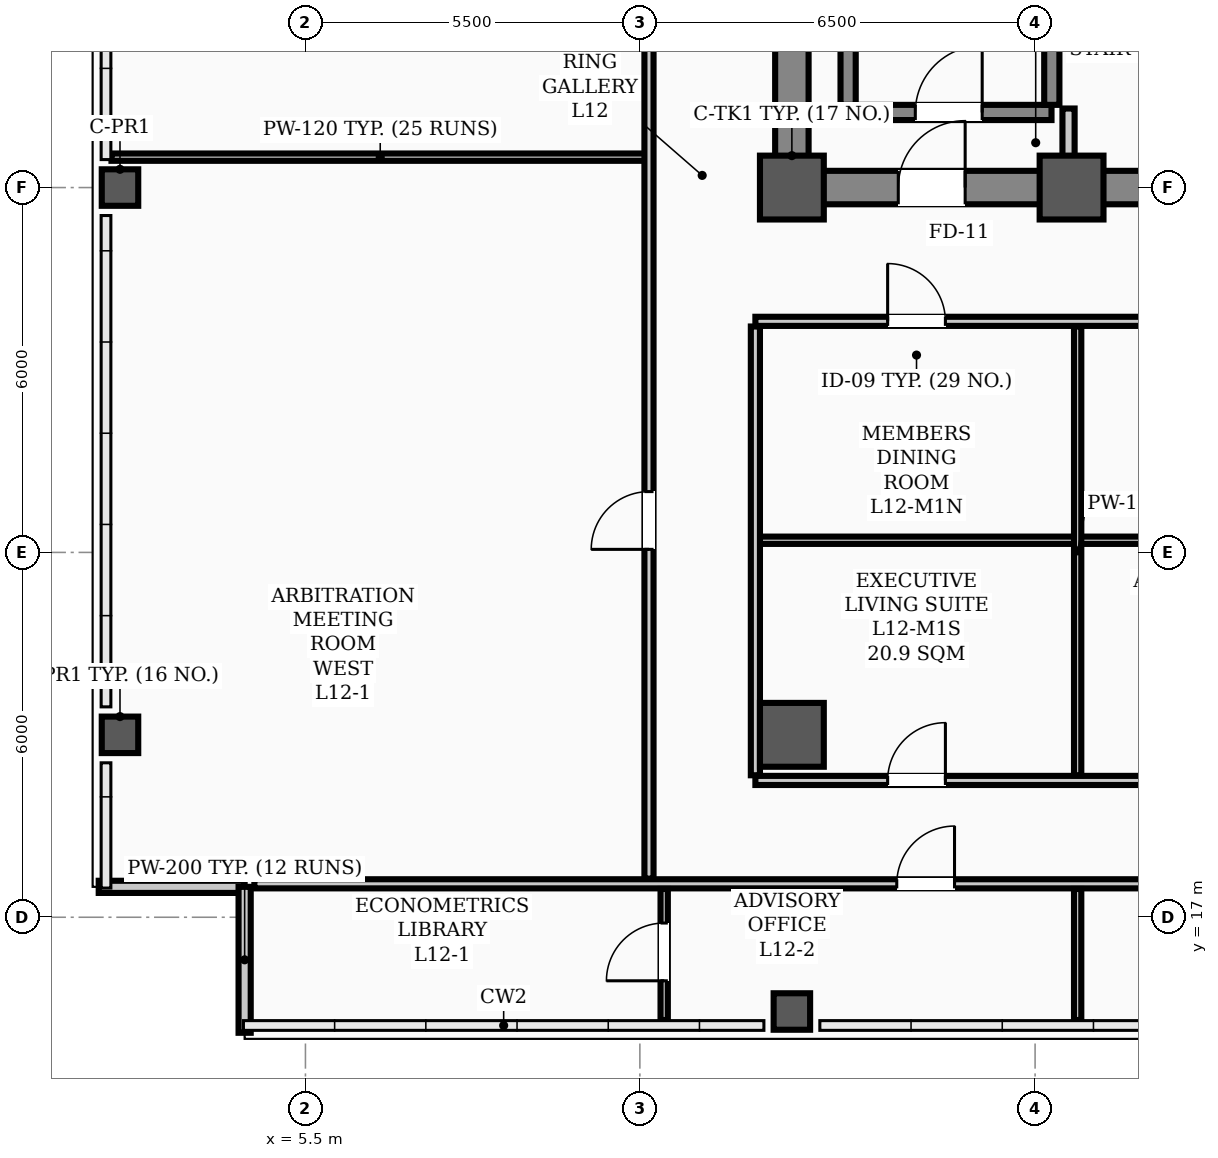
"""IFC4 building model, lengths in metres.
Left out: names, types, materials, properties, quantities, classifications, styles, units other than length and angle.
Written with IfcOpenShell. Run it as: python <this file> out.ifc"""

import sys

from ifc_helpers import new_model, si_unit, direction, frame, frame_2d, origin, origin_2d, place, context, subcontext, project, spatial, rectangle, hollow_rectangle, extrude, element, fill, save


model = new_model("IFC4")
c1 = context("Model", 3, precision=1e-05, world=origin(), true_north=direction((0.0, 1.0)))
c2 = subcontext(c1, "Body", "Model", "MODEL_VIEW")
j1 = project(units=[si_unit("LENGTHUNIT", "METRE"), si_unit("PLANEANGLEUNIT", "RADIAN")], contexts=[c1])
p1 = place(None, origin())
s1 = spatial("IfcSite", under=j1, at=p1, CompositionType="ELEMENT")
p2 = place(p1, origin())
s2 = spatial("IfcBuilding", under=s1, at=p2, CompositionType="ELEMENT")
p3 = place(p2, frame((0.0, 0.0, 49.9)))
s3 = spatial("IfcBuildingStorey", under=s2, at=p3, CompositionType="ELEMENT", Elevation=49.9)
for number, where, z_axis, x_axis in (
    (1, (13.5, 29.0, 0.0), (0.0, 0.0, 1.0), (1.0, 0.0, 0.0)),
    (2, (18.1, 29.0, 0.0), (0.0, 0.0, 1.0), (1.0, 0.0, 0.0)),
    (3, (13.5, 20.0, 0.0), (0.0, 0.0, 1.0), (1.0, 0.0, 0.0)),
):
    element("IfcColumn", number, at=place(p3, frame(where, z_axis=z_axis, x_axis=x_axis)), inside=s3, PredefinedType="COLUMN", context=c2, shape_type="SweptSolid", body=[
        extrude(hollow_rectangle(XDim=1.05, YDim=1.05, WallThickness=0.038, InnerFilletRadius=0.019, OuterFilletRadius=0.057, at=origin_2d()), origin(), (0.0, 0.0, 1.0), 3.9),
    ])
for number, where, z_axis, x_axis in (
    (4, (2.45, 20.0, 0.0), (0.0, 0.0, 1.0), (1.0, 0.0, 0.0)),
    (5, (2.45, 29.0, 0.0), (0.0, 0.0, 1.0), (1.0, 0.0, 0.0)),
):
    element("IfcColumn", number, at=place(p3, frame(where, z_axis=z_axis, x_axis=x_axis)), inside=s3, PredefinedType="COLUMN", context=c2, shape_type="SweptSolid", body=[
        extrude(hollow_rectangle(XDim=0.6, YDim=0.6, WallThickness=0.026, InnerFilletRadius=0.013, OuterFilletRadius=0.039, at=origin_2d()), origin(), (0.0, 0.0, 1.0), 3.66),
    ])
p4 = place(p3, frame((13.5, 15.45, 0.0), z_axis=(0.0, 0.0, 1.0), x_axis=(1.0, 0.0, 0.0)))
e6 = element("IfcColumn", 6, at=p4, inside=s3, PredefinedType="COLUMN", context=c2, shape_type="SweptSolid", body=[
    extrude(hollow_rectangle(XDim=0.6, YDim=0.6, WallThickness=0.026, InnerFilletRadius=0.013, OuterFilletRadius=0.039, at=origin_2d()), origin(), (0.0, 0.0, 1.0), 3.9),
])
for number, where, z_axis, x_axis in (
    (7, (2.1, 17.5, 0.0), (0.0, 0.0, 1.0), (1.0, 0.0, 0.0)),
    (8, (4.5, 17.5, 0.0), (0.0, 0.0, 1.0), (0.0, -1.0, 0.0)),
):
    element("IfcWall", number, at=place(p3, frame(where, z_axis=z_axis, x_axis=x_axis)), inside=s3, PredefinedType="PARAPET", context=c2, shape_type="SweptSolid", body=[
        extrude(rectangle(XDim=2.4, YDim=0.2, at=frame_2d((1.2, 0.0))), origin(), (0.0, 0.0, 1.0), 1.2),
    ])
p5 = place(p3, frame((13.5, 29.0, 0.0), z_axis=(0.0, 0.0, 1.0), x_axis=(1.0, 0.0, 0.0)))
e9 = element("IfcWall", 9, at=p5, inside=s3, PredefinedType="SHEAR", context=c2, shape_type="SweptSolid", body=[
    extrude(rectangle(XDim=30.5, YDim=0.55, at=frame_2d((15.25, 0.0))), origin(), (0.0, 0.0, 1.0), 3.66),
])
p6 = place(p5, frame((1.75, 0.0, 0.0)))
e10 = element("IfcOpeningElement", 10, at=p6, cuts=e9, PredefinedType="OPENING", context=c2, shape_type="SweptSolid", body=[
    extrude(rectangle(XDim=1.1, YDim=2.08, at=frame_2d((0.55, 1.04))), frame((0.0, 0.285, 0.0), z_axis=(0.0, -1.0, 0.0), x_axis=(1.0, 0.0, 0.0)), (0.0, 0.0, 1.0), 0.57),
])
p7 = place(p5, frame((26.7, 0.0, 0.0)))
e11 = element("IfcOpeningElement", 11, at=p7, cuts=e9, PredefinedType="OPENING", context=c2, shape_type="SweptSolid", body=[
    extrude(rectangle(XDim=1.1, YDim=2.08, at=frame_2d((0.55, 1.04))), frame((0.0, 0.285, 0.0), z_axis=(0.0, -1.0, 0.0), x_axis=(1.0, 0.0, 0.0)), (0.0, 0.0, 1.0), 0.57),
])
p8 = place(p5, frame((6.8, 0.0, 0.0)))
e12 = element("IfcOpeningElement", 12, at=p8, cuts=e9, PredefinedType="OPENING", context=c2, shape_type="SweptSolid", body=[
    extrude(rectangle(XDim=1.1, YDim=2.08, at=frame_2d((0.55, 1.04))), frame((0.0, 0.285, 0.0), z_axis=(0.0, -1.0, 0.0), x_axis=(1.0, 0.0, 0.0)), (0.0, 0.0, 1.0), 0.57),
])
p9 = place(p5, frame((13.2, 0.0, 0.0)))
e13 = element("IfcOpeningElement", 13, at=p9, cuts=e9, PredefinedType="OPENING", context=c2, shape_type="SweptSolid", body=[
    extrude(rectangle(XDim=1.6, YDim=2.08, at=frame_2d((0.8, 1.04))), frame((0.0, 0.285, 0.0), z_axis=(0.0, -1.0, 0.0), x_axis=(1.0, 0.0, 0.0)), (0.0, 0.0, 1.0), 0.57),
])
p10 = place(p5, frame((19.53, 0.0, 0.0)))
e14 = element("IfcOpeningElement", 14, at=p10, cuts=e9, PredefinedType="OPENING", context=c2, shape_type="SweptSolid", body=[
    extrude(rectangle(XDim=0.9, YDim=2.08, at=frame_2d((0.45, 1.04))), frame((0.0, 0.285, 0.0), z_axis=(0.0, -1.0, 0.0), x_axis=(1.0, 0.0, 0.0)), (0.0, 0.0, 1.0), 0.57),
])
p11 = place(p5, frame((21.57, 0.0, 0.0)))
e15 = element("IfcOpeningElement", 15, at=p11, cuts=e9, PredefinedType="OPENING", context=c2, shape_type="SweptSolid", body=[
    extrude(rectangle(XDim=0.9, YDim=2.08, at=frame_2d((0.45, 1.04))), frame((0.0, 0.285, 0.0), z_axis=(0.0, -1.0, 0.0), x_axis=(1.0, 0.0, 0.0)), (0.0, 0.0, 1.0), 0.57),
])
p12 = place(p3, frame((13.5, 29.35, 0.0), z_axis=(0.0, 0.0, 1.0), x_axis=(0.0, 1.0, 0.0)))
e16 = element("IfcWall", 16, at=p12, inside=s3, PredefinedType="SHEAR", context=c2, shape_type="SweptSolid", body=[
    extrude(rectangle(XDim=8.6, YDim=0.55, at=frame_2d((4.3, 0.0))), origin(), (0.0, 0.0, 1.0), 3.66),
])
p13 = place(p3, frame((14.43, 30.235, 0.0), z_axis=(0.0, 0.0, 1.0), x_axis=(1.0, 0.0, 0.0)))
e17 = element("IfcWall", 17, at=p13, inside=s3, PredefinedType="STANDARD", context=c2, shape_type="SweptSolid", body=[
    extrude(rectangle(XDim=3.34, YDim=0.25, at=frame_2d((1.67, 0.0))), origin(), (0.0, 0.0, 1.0), 3.66),
])
p14 = place(p13, frame((1.1, 0.0, 0.0)))
e18 = element("IfcOpeningElement", 18, at=p14, cuts=e17, PredefinedType="OPENING", context=c2, shape_type="SweptSolid", body=[
    extrude(rectangle(XDim=1.1, YDim=2.08, at=frame_2d((0.55, 1.04))), frame((0.0, 0.135, 0.0), z_axis=(0.0, -1.0, 0.0), x_axis=(1.0, 0.0, 0.0)), (0.0, 0.0, 1.0), 0.27),
])
for number, where, z_axis, x_axis in (
    (19, (14.425, 30.36, 0.0), (0.0, 0.0, 1.0), (0.0, 1.0, 0.0)),
    (20, (17.775, 30.36, 0.0), (0.0, 0.0, 1.0), (0.0, 1.0, 0.0)),
):
    element("IfcWall", number, at=place(p3, frame(where, z_axis=z_axis, x_axis=x_axis)), inside=s3, PredefinedType="STANDARD", context=c2, shape_type="SweptSolid", body=[
        extrude(rectangle(XDim=7.184, YDim=0.25, at=frame_2d((3.592, 0.0))), origin(), (0.0, 0.0, 1.0), 3.66),
    ])
p15 = place(p3, frame((12.9, 26.8, 0.0), z_axis=(0.0, 0.0, 1.0), x_axis=(1.0, 0.0, 0.0)))
e21 = element("IfcWall", 21, at=p15, inside=s3, PredefinedType="PARTITIONING", context=c2, shape_type="SweptSolid", body=[
    extrude(rectangle(XDim=31.7, YDim=0.15, at=frame_2d((15.85, 0.0))), origin(), (0.0, 0.0, 1.0), 2.24),
])
p16 = place(p15, frame((13.6, 0.0, 0.0)))
e22 = element("IfcOpeningElement", 22, at=p16, cuts=e21, PredefinedType="OPENING", context=c2, shape_type="SweptSolid", body=[
    extrude(rectangle(XDim=1.6, YDim=2.08, at=frame_2d((0.8, 1.04))), frame((0.0, 0.085, 0.0), z_axis=(0.0, -1.0, 0.0), x_axis=(1.0, 0.0, 0.0)), (0.0, 0.0, 1.0), 0.17),
])
p17 = place(p15, frame((2.175, 0.0, 0.0)))
e23 = element("IfcOpeningElement", 23, at=p17, cuts=e21, PredefinedType="OPENING", context=c2, shape_type="SweptSolid", body=[
    extrude(rectangle(XDim=0.95, YDim=2.08, at=frame_2d((0.475, 1.04))), frame((0.0, 0.085, 0.0), z_axis=(0.0, -1.0, 0.0), x_axis=(1.0, 0.0, 0.0)), (0.0, 0.0, 1.0), 0.17),
])
p18 = place(p15, frame((6.925, 0.0, 0.0)))
e24 = element("IfcOpeningElement", 24, at=p18, cuts=e21, PredefinedType="OPENING", context=c2, shape_type="SweptSolid", body=[
    extrude(rectangle(XDim=0.95, YDim=2.08, at=frame_2d((0.475, 1.04))), frame((0.0, 0.085, 0.0), z_axis=(0.0, -1.0, 0.0), x_axis=(1.0, 0.0, 0.0)), (0.0, 0.0, 1.0), 0.17),
])
p19 = place(p15, frame((10.925, 0.0, 0.0)))
e25 = element("IfcOpeningElement", 25, at=p19, cuts=e21, PredefinedType="OPENING", context=c2, shape_type="SweptSolid", body=[
    extrude(rectangle(XDim=0.95, YDim=2.08, at=frame_2d((0.475, 1.04))), frame((0.0, 0.085, 0.0), z_axis=(0.0, -1.0, 0.0), x_axis=(1.0, 0.0, 0.0)), (0.0, 0.0, 1.0), 0.17),
])
p20 = place(p15, frame((16.025, 0.0, 0.0)))
e26 = element("IfcOpeningElement", 26, at=p20, cuts=e21, PredefinedType="OPENING", context=c2, shape_type="SweptSolid", body=[
    extrude(rectangle(XDim=0.95, YDim=2.08, at=frame_2d((0.475, 1.04))), frame((0.0, 0.085, 0.0), z_axis=(0.0, -1.0, 0.0), x_axis=(1.0, 0.0, 0.0)), (0.0, 0.0, 1.0), 0.17),
])
p21 = place(p15, frame((21.725, 0.0, 0.0)))
e27 = element("IfcOpeningElement", 27, at=p21, cuts=e21, PredefinedType="OPENING", context=c2, shape_type="SweptSolid", body=[
    extrude(rectangle(XDim=0.95, YDim=2.08, at=frame_2d((0.475, 1.04))), frame((0.0, 0.085, 0.0), z_axis=(0.0, -1.0, 0.0), x_axis=(1.0, 0.0, 0.0)), (0.0, 0.0, 1.0), 0.17),
])
p22 = place(p15, frame((27.925, 0.0, 0.0)))
e28 = element("IfcOpeningElement", 28, at=p22, cuts=e21, PredefinedType="OPENING", context=c2, shape_type="SweptSolid", body=[
    extrude(rectangle(XDim=0.95, YDim=2.08, at=frame_2d((0.475, 1.04))), frame((0.0, 0.085, 0.0), z_axis=(0.0, -1.0, 0.0), x_axis=(1.0, 0.0, 0.0)), (0.0, 0.0, 1.0), 0.17),
])
p23 = place(p3, frame((4.66, 17.55, 0.0), z_axis=(0.0, 0.0, 1.0), x_axis=(1.0, 0.0, 0.0)))
e29 = element("IfcWall", 29, at=p23, inside=s3, PredefinedType="PARTITIONING", context=c2, shape_type="SweptSolid", body=[
    extrude(rectangle(XDim=44.68, YDim=0.15, at=frame_2d((22.34, 0.0))), origin(), (0.0, 0.0, 1.0), 2.24),
])
p24 = place(p23, frame((10.565, 0.0, 0.0)))
e30 = element("IfcOpeningElement", 30, at=p24, cuts=e29, PredefinedType="OPENING", context=c2, shape_type="SweptSolid", body=[
    extrude(rectangle(XDim=0.95, YDim=2.08, at=frame_2d((0.475, 1.04))), frame((0.0, 0.085, 0.0), z_axis=(0.0, -1.0, 0.0), x_axis=(1.0, 0.0, 0.0)), (0.0, 0.0, 1.0), 0.17),
])
p25 = place(p23, frame((16.165, 0.0, 0.0)))
e31 = element("IfcOpeningElement", 31, at=p25, cuts=e29, PredefinedType="OPENING", context=c2, shape_type="SweptSolid", body=[
    extrude(rectangle(XDim=0.95, YDim=2.08, at=frame_2d((0.475, 1.04))), frame((0.0, 0.085, 0.0), z_axis=(0.0, -1.0, 0.0), x_axis=(1.0, 0.0, 0.0)), (0.0, 0.0, 1.0), 0.17),
])
p26 = place(p23, frame((30.565, 0.0, 0.0)))
e32 = element("IfcOpeningElement", 32, at=p26, cuts=e29, PredefinedType="OPENING", context=c2, shape_type="SweptSolid", body=[
    extrude(rectangle(XDim=0.95, YDim=2.08, at=frame_2d((0.475, 1.04))), frame((0.0, 0.085, 0.0), z_axis=(0.0, -1.0, 0.0), x_axis=(1.0, 0.0, 0.0)), (0.0, 0.0, 1.0), 0.17),
])
p27 = place(p23, frame((37.365, 0.0, 0.0)))
e33 = element("IfcOpeningElement", 33, at=p27, cuts=e29, PredefinedType="OPENING", context=c2, shape_type="SweptSolid", body=[
    extrude(rectangle(XDim=0.95, YDim=2.08, at=frame_2d((0.475, 1.04))), frame((0.0, 0.085, 0.0), z_axis=(0.0, -1.0, 0.0), x_axis=(1.0, 0.0, 0.0)), (0.0, 0.0, 1.0), 0.17),
])
p28 = place(p3, frame((12.9, 19.25, 0.0), z_axis=(0.0, 0.0, 1.0), x_axis=(1.0, 0.0, 0.0)))
e34 = element("IfcWall", 34, at=p28, inside=s3, PredefinedType="PARTITIONING", context=c2, shape_type="SweptSolid", body=[
    extrude(rectangle(XDim=13.3, YDim=0.15, at=frame_2d((6.65, 0.0))), origin(), (0.0, 0.0, 1.0), 2.24),
])
p29 = place(p28, frame((2.175, 0.0, 0.0)))
e35 = element("IfcOpeningElement", 35, at=p29, cuts=e34, PredefinedType="OPENING", context=c2, shape_type="SweptSolid", body=[
    extrude(rectangle(XDim=0.95, YDim=2.08, at=frame_2d((0.475, 1.04))), frame((0.0, 0.085, 0.0), z_axis=(0.0, -1.0, 0.0), x_axis=(1.0, 0.0, 0.0)), (0.0, 0.0, 1.0), 0.17),
])
p30 = place(p28, frame((6.925, 0.0, 0.0)))
e36 = element("IfcOpeningElement", 36, at=p30, cuts=e34, PredefinedType="OPENING", context=c2, shape_type="SweptSolid", body=[
    extrude(rectangle(XDim=0.95, YDim=2.08, at=frame_2d((0.475, 1.04))), frame((0.0, 0.085, 0.0), z_axis=(0.0, -1.0, 0.0), x_axis=(1.0, 0.0, 0.0)), (0.0, 0.0, 1.0), 0.17),
])
p31 = place(p28, frame((12.19, 0.0, 0.0)))
e37 = element("IfcOpeningElement", 37, at=p31, cuts=e34, PredefinedType="OPENING", context=c2, shape_type="SweptSolid", body=[
    extrude(rectangle(XDim=0.95, YDim=2.08, at=frame_2d((0.475, 1.04))), frame((0.0, 0.085, 0.0), z_axis=(0.0, -1.0, 0.0), x_axis=(1.0, 0.0, 0.0)), (0.0, 0.0, 1.0), 0.17),
])
p32 = place(p3, frame((12.9, 23.2, 0.0), z_axis=(0.0, 0.0, 1.0), x_axis=(1.0, 0.0, 0.0)))
e38 = element("IfcWall", 38, at=p32, inside=s3, PredefinedType="PARTITIONING", context=c2, shape_type="SweptSolid", body=[
    extrude(rectangle(XDim=5.3, YDim=0.12, at=frame_2d((2.65, 0.0))), origin(), (0.0, 0.0, 1.0), 2.24),
])
p33 = place(p3, frame((18.2, 23.2, 0.0), z_axis=(0.0, 0.0, 1.0), x_axis=(1.0, 0.0, 0.0)))
e39 = element("IfcWall", 39, at=p33, inside=s3, PredefinedType="PARTITIONING", context=c2, shape_type="SweptSolid", body=[
    extrude(rectangle(XDim=4.2, YDim=0.12, at=frame_2d((2.1, 0.0))), origin(), (0.0, 0.0, 1.0), 3.24),
])
p34 = place(p3, frame((2.31, 29.5, 0.0), z_axis=(0.0, 0.0, 1.0), x_axis=(1.0, 0.0, 0.0)))
e40 = element("IfcWall", 40, at=p34, inside=s3, PredefinedType="PARTITIONING", context=c2, shape_type="SweptSolid", body=[
    extrude(rectangle(XDim=8.84, YDim=0.12, at=frame_2d((4.42, 0.0))), origin(), (0.0, 0.0, 1.0), 2.24),
])
p35 = place(p3, frame((18.05, 29.285, 0.0), z_axis=(0.0, 0.0, 1.0), x_axis=(0.0, 1.0, 0.0)))
e41 = element("IfcWall", 41, at=p35, inside=s3, PredefinedType="STANDARD", context=c2, shape_type="SweptSolid", body=[
    extrude(rectangle(XDim=1.015, YDim=0.2, at=frame_2d((0.508, 0.0))), origin(), (0.0, 0.0, 1.0), 2.24),
])
p36 = place(p3, frame((11.15, 17.635, 0.0), z_axis=(0.0, 0.0, 1.0), x_axis=(0.0, 1.0, 0.0)))
e42 = element("IfcWall", 42, at=p36, inside=s3, PredefinedType="PARTITIONING", context=c2, shape_type="SweptSolid", body=[
    extrude(rectangle(XDim=22.53, YDim=0.15, at=frame_2d((11.265, 0.0))), origin(), (0.0, 0.0, 1.0), 2.24),
])
p37 = place(p36, frame((5.415, 0.0, 0.0)))
e43 = element("IfcOpeningElement", 43, at=p37, cuts=e42, PredefinedType="OPENING", context=c2, shape_type="SweptSolid", body=[
    extrude(rectangle(XDim=0.95, YDim=2.08, at=frame_2d((0.475, 1.04))), frame((0.0, 0.085, 0.0), z_axis=(0.0, -1.0, 0.0), x_axis=(1.0, 0.0, 0.0)), (0.0, 0.0, 1.0), 0.17),
])
p38 = place(p36, frame((16.765, 0.0, 0.0)))
e44 = element("IfcOpeningElement", 44, at=p38, cuts=e42, PredefinedType="OPENING", context=c2, shape_type="SweptSolid", body=[
    extrude(rectangle(XDim=0.95, YDim=2.08, at=frame_2d((0.475, 1.04))), frame((0.0, 0.085, 0.0), z_axis=(0.0, -1.0, 0.0), x_axis=(1.0, 0.0, 0.0)), (0.0, 0.0, 1.0), 0.17),
])
p39 = place(p3, frame((12.9, 19.335, 0.0), z_axis=(0.0, 0.0, 1.0), x_axis=(0.0, 1.0, 0.0)))
e45 = element("IfcWall", 45, at=p39, inside=s3, PredefinedType="PARTITIONING", context=c2, shape_type="SweptSolid", body=[
    extrude(rectangle(XDim=7.38, YDim=0.15, at=frame_2d((3.69, 0.0))), origin(), (0.0, 0.0, 1.0), 2.24),
])
p40 = place(p3, frame((11.4, 15.31, 0.0), z_axis=(0.0, 0.0, 1.0), x_axis=(0.0, 1.0, 0.0)))
e46 = element("IfcWall", 46, at=p40, inside=s3, PredefinedType="PARTITIONING", context=c2, shape_type="SweptSolid", body=[
    extrude(rectangle(XDim=2.155, YDim=0.12, at=frame_2d((1.078, 0.0))), origin(), (0.0, 0.0, 1.0), 3.66),
])
p41 = place(p40, frame((0.645, 0.0, 0.0)))
e47 = element("IfcOpeningElement", 47, at=p41, cuts=e46, PredefinedType="OPENING", context=c2, shape_type="SweptSolid", body=[
    extrude(rectangle(XDim=0.95, YDim=2.08, at=frame_2d((0.475, 1.04))), frame((0.0, 0.07, 0.0), z_axis=(0.0, -1.0, 0.0), x_axis=(1.0, 0.0, 0.0)), (0.0, 0.0, 1.0), 0.14),
])
p42 = place(p3, frame((18.2, 15.31, 0.0), z_axis=(0.0, 0.0, 1.0), x_axis=(0.0, 1.0, 0.0)))
e48 = element("IfcWall", 48, at=p42, inside=s3, PredefinedType="PARTITIONING", context=c2, shape_type="SweptSolid", body=[
    extrude(rectangle(XDim=2.155, YDim=0.12, at=frame_2d((1.078, 0.0))), origin(), (0.0, 0.0, 1.0), 2.24),
])
p43 = place(p3, frame((18.2, 19.335, 0.0), z_axis=(0.0, 0.0, 1.0), x_axis=(0.0, 1.0, 0.0)))
e49 = element("IfcWall", 49, at=p43, inside=s3, PredefinedType="PARTITIONING", context=c2, shape_type="SweptSolid", body=[
    extrude(rectangle(XDim=7.38, YDim=0.12, at=frame_2d((3.69, 0.0))), origin(), (0.0, 0.0, 1.0), 2.24),
])
p44 = place(p14, origin())
e50 = element("IfcDoor", 50, at=p44, inside=s3, OperationType="SINGLE_SWING_RIGHT", PredefinedType="DOOR", context=c2, shape_type="SweptSolid", body=[
    extrude(rectangle(XDim=1.1, YDim=2.08, at=frame_2d((0.55, 1.04))), frame((0.0, 0.025, 0.0), z_axis=(0.0, -1.0, 0.0), x_axis=(1.0, 0.0, 0.0)), (0.0, 0.0, 1.0), 0.05),
])
fill(e18, e50)
p45 = place(p6, origin())
e51 = element("IfcDoor", 51, at=p45, inside=s3, OperationType="SINGLE_SWING_RIGHT", PredefinedType="DOOR", context=c2, shape_type="SweptSolid", body=[
    extrude(rectangle(XDim=1.1, YDim=2.08, at=frame_2d((0.55, 1.04))), frame((0.0, 0.025, 0.0), z_axis=(0.0, -1.0, 0.0), x_axis=(1.0, 0.0, 0.0)), (0.0, 0.0, 1.0), 0.05),
])
fill(e10, e51)
p46 = place(p41, origin())
e52 = element("IfcDoor", 52, at=p46, inside=s3, OperationType="SINGLE_SWING_LEFT", PredefinedType="DOOR", context=c2, shape_type="SweptSolid", body=[
    extrude(rectangle(XDim=0.95, YDim=2.08, at=frame_2d((0.475, 1.04))), frame((0.0, 0.025, 0.0), z_axis=(0.0, -1.0, 0.0), x_axis=(1.0, 0.0, 0.0)), (0.0, 0.0, 1.0), 0.05),
])
fill(e47, e52)
p47 = place(p24, origin())
e53 = element("IfcDoor", 53, at=p47, inside=s3, OperationType="SINGLE_SWING_RIGHT", PredefinedType="DOOR", context=c2, shape_type="SweptSolid", body=[
    extrude(rectangle(XDim=0.95, YDim=2.08, at=frame_2d((0.475, 1.04))), frame((0.0, 0.025, 0.0), z_axis=(0.0, -1.0, 0.0), x_axis=(1.0, 0.0, 0.0)), (0.0, 0.0, 1.0), 0.05),
])
fill(e30, e53)
p48 = place(p17, origin())
e54 = element("IfcDoor", 54, at=p48, inside=s3, OperationType="SINGLE_SWING_LEFT", PredefinedType="DOOR", context=c2, shape_type="SweptSolid", body=[
    extrude(rectangle(XDim=0.95, YDim=2.08, at=frame_2d((0.475, 1.04))), frame((0.0, 0.025, 0.0), z_axis=(0.0, -1.0, 0.0), x_axis=(1.0, 0.0, 0.0)), (0.0, 0.0, 1.0), 0.05),
])
fill(e23, e54)
p49 = place(p29, origin())
e55 = element("IfcDoor", 55, at=p49, inside=s3, OperationType="SINGLE_SWING_RIGHT", PredefinedType="DOOR", context=c2, shape_type="SweptSolid", body=[
    extrude(rectangle(XDim=0.95, YDim=2.08, at=frame_2d((0.475, 1.04))), frame((0.0, 0.025, 0.0), z_axis=(0.0, -1.0, 0.0), x_axis=(1.0, 0.0, 0.0)), (0.0, 0.0, 1.0), 0.05),
])
fill(e35, e55)
p50 = place(p37, origin())
e56 = element("IfcDoor", 56, at=p50, inside=s3, OperationType="SINGLE_SWING_LEFT", PredefinedType="DOOR", context=c2, shape_type="SweptSolid", body=[
    extrude(rectangle(XDim=0.95, YDim=2.08, at=frame_2d((0.475, 1.04))), frame((0.0, 0.025, 0.0), z_axis=(0.0, -1.0, 0.0), x_axis=(1.0, 0.0, 0.0)), (0.0, 0.0, 1.0), 0.05),
])
fill(e43, e56)
save(model, sys.argv[1])
